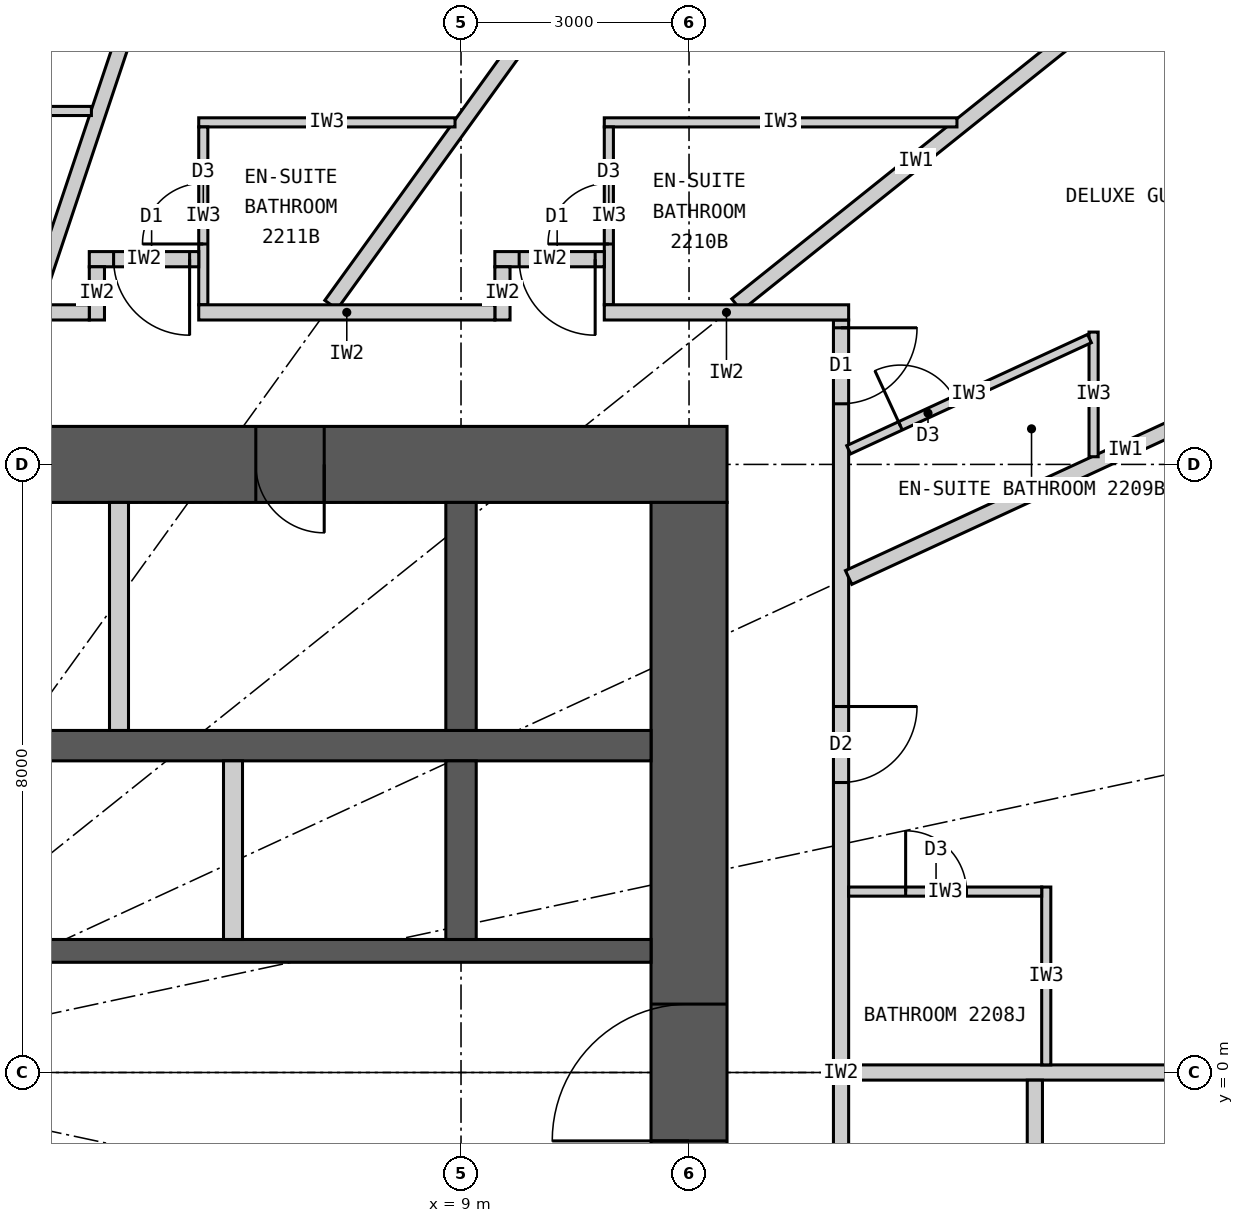
"""IFC4 building model, lengths in metres.
Left out: names, types, materials, properties, quantities, classifications, styles, units other than length and angle.
Written with IfcOpenShell. Run it as: python <this file> out.ifc"""

import sys

from ifc_helpers import new_model, si_unit, direction, frame, frame_2d, origin, place, context, subcontext, project, spatial, rectangle, extrude, element, fill, save


model = new_model("IFC4")
c1 = context("Model", 3, precision=1e-05, world=origin(), true_north=direction((0.0, 1.0)))
c2 = subcontext(c1, "Body", "Model", "MODEL_VIEW")
j1 = project(units=[si_unit("LENGTHUNIT", "METRE"), si_unit("PLANEANGLEUNIT", "RADIAN")], contexts=[c1])
p1 = place(None, origin())
s1 = spatial("IfcSite", under=j1, at=p1, CompositionType="ELEMENT")
p2 = place(p1, origin())
s2 = spatial("IfcBuilding", under=s1, at=p2, CompositionType="ELEMENT")
p3 = place(p2, frame((0.0, 0.0, 87.0)))
s3 = spatial("IfcBuildingStorey", under=s2, at=p3, CompositionType="ELEMENT", Elevation=87.0)
p4 = place(p3, frame((-12.5, 8.0, 0.0), z_axis=(0.0, 0.0, 1.0), x_axis=(1.0, 0.0, 0.0)))
e1 = element("IfcWall", 1, at=p4, inside=s3, PredefinedType="SHEAR", context=c2, shape_type="SweptSolid", body=[
    extrude(rectangle(XDim=25.0, YDim=1.0, at=frame_2d((12.5, 0.0))), origin(), (0.0, 0.0, 1.0), 3.3),
])
p5 = place(p4, frame((11.2, 0.0, 0.0)))
e2 = element("IfcOpeningElement", 2, at=p5, cuts=e1, PredefinedType="OPENING", context=c2, shape_type="SweptSolid", body=[
    extrude(rectangle(XDim=1.2, YDim=2.2, at=frame_2d((0.6, 1.1))), frame((0.0, 0.51, 0.0), z_axis=(0.0, -1.0, 0.0), x_axis=(1.0, 0.0, 0.0)), (0.0, 0.0, 1.0), 1.02),
])
p6 = place(p4, frame((18.8, 0.0, 0.0)))
e3 = element("IfcOpeningElement", 3, at=p6, cuts=e1, PredefinedType="OPENING", context=c2, shape_type="SweptSolid", body=[
    extrude(rectangle(XDim=0.9, YDim=2.2, at=frame_2d((0.45, 1.1))), frame((0.0, 0.51, 0.0), z_axis=(0.0, -1.0, 0.0), x_axis=(1.0, 0.0, 0.0)), (0.0, 0.0, 1.0), 1.02),
])
p7 = place(p3, frame((12.0, -7.5, 0.0), z_axis=(0.0, 0.0, 1.0), x_axis=(0.0, 1.0, 0.0)))
e4 = element("IfcWall", 4, at=p7, inside=s3, PredefinedType="SHEAR", context=c2, shape_type="SweptSolid", body=[
    extrude(rectangle(XDim=15.0, YDim=1.0, at=frame_2d((7.5, 0.0))), origin(), (0.0, 0.0, 1.0), 3.3),
])
p8 = place(p7, frame((6.6, 0.0, 0.0)))
e5 = element("IfcOpeningElement", 5, at=p8, cuts=e4, PredefinedType="OPENING", context=c2, shape_type="SweptSolid", body=[
    extrude(rectangle(XDim=1.8, YDim=2.2, at=frame_2d((0.9, 1.1))), frame((0.0, 0.51, 0.0), z_axis=(0.0, -1.0, 0.0), x_axis=(1.0, 0.0, 0.0)), (0.0, 0.0, 1.0), 1.02),
])
p9 = place(p3, frame((-11.5, 4.3, 0.0), z_axis=(0.0, 0.0, 1.0), x_axis=(1.0, 0.0, 0.0)))
e6 = element("IfcWall", 6, at=p9, inside=s3, PredefinedType="SHEAR", context=c2, shape_type="SweptSolid", body=[
    extrude(rectangle(XDim=23.0, YDim=0.4, at=frame_2d((11.5, 0.0))), origin(), (0.0, 0.0, 1.0), 3.3),
])
p10 = place(p3, frame((-11.5, 1.6, 0.0), z_axis=(0.0, 0.0, 1.0), x_axis=(1.0, 0.0, 0.0)))
e7 = element("IfcWall", 7, at=p10, inside=s3, PredefinedType="SHEAR", context=c2, shape_type="SweptSolid", body=[
    extrude(rectangle(XDim=23.0, YDim=0.3, at=frame_2d((11.5, 0.0))), origin(), (0.0, 0.0, 1.0), 3.3),
])
p11 = place(p10, frame((0.45, 0.0, 0.0)))
e8 = element("IfcOpeningElement", 8, at=p11, cuts=e7, PredefinedType="OPENING", context=c2, shape_type="SweptSolid", body=[
    extrude(rectangle(XDim=1.1, YDim=2.2, at=frame_2d((0.55, 1.1))), frame((0.0, 0.16, 0.0), z_axis=(0.0, -1.0, 0.0), x_axis=(1.0, 0.0, 0.0)), (0.0, 0.0, 1.0), 0.32),
])
p12 = place(p10, frame((3.45, 0.0, 0.0)))
e9 = element("IfcOpeningElement", 9, at=p12, cuts=e7, PredefinedType="OPENING", context=c2, shape_type="SweptSolid", body=[
    extrude(rectangle(XDim=1.1, YDim=2.2, at=frame_2d((0.55, 1.1))), frame((0.0, 0.16, 0.0), z_axis=(0.0, -1.0, 0.0), x_axis=(1.0, 0.0, 0.0)), (0.0, 0.0, 1.0), 0.32),
])
p13 = place(p10, frame((11.05, 0.0, 0.0)))
e10 = element("IfcOpeningElement", 10, at=p13, cuts=e7, PredefinedType="OPENING", context=c2, shape_type="SweptSolid", body=[
    extrude(rectangle(XDim=0.9, YDim=2.2, at=frame_2d((0.45, 1.1))), frame((0.0, 0.16, 0.0), z_axis=(0.0, -1.0, 0.0), x_axis=(1.0, 0.0, 0.0)), (0.0, 0.0, 1.0), 0.32),
])
p14 = place(p3, frame((9.0, 4.5, 0.0), z_axis=(0.0, 0.0, 1.0), x_axis=(0.0, 1.0, 0.0)))
e11 = element("IfcWall", 11, at=p14, inside=s3, PredefinedType="SHEAR", context=c2, shape_type="SweptSolid", body=[
    extrude(rectangle(XDim=3.0, YDim=0.4, at=frame_2d((1.5, 0.0))), origin(), (0.0, 0.0, 1.0), 3.3),
])
p15 = place(p3, frame((9.0, 1.75, 0.0), z_axis=(0.0, 0.0, 1.0), x_axis=(0.0, 1.0, 0.0)))
e12 = element("IfcWall", 12, at=p15, inside=s3, PredefinedType="SHEAR", context=c2, shape_type="SweptSolid", body=[
    extrude(rectangle(XDim=2.35, YDim=0.4, at=frame_2d((1.175, 0.0))), origin(), (0.0, 0.0, 1.0), 3.3),
])
p16 = place(p3, frame((4.5, 4.5, 0.0), z_axis=(0.0, 0.0, 1.0), x_axis=(0.0, 1.0, 0.0)))
e13 = element("IfcWall", 13, at=p16, inside=s3, PredefinedType="PARTITIONING", context=c2, shape_type="SweptSolid", body=[
    extrude(rectangle(XDim=3.0, YDim=0.25, at=frame_2d((1.5, 0.0))), origin(), (0.0, 0.0, 1.0), 3.3),
])
p17 = place(p3, frame((6.0, 1.75, 0.0), z_axis=(0.0, 0.0, 1.0), x_axis=(0.0, 1.0, 0.0)))
e14 = element("IfcWall", 14, at=p17, inside=s3, PredefinedType="PARTITIONING", context=c2, shape_type="SweptSolid", body=[
    extrude(rectangle(XDim=2.35, YDim=0.25, at=frame_2d((1.175, 0.0))), origin(), (0.0, 0.0, 1.0), 3.3),
])
p18 = place(p3, frame((14.0, -9.9, 0.0), z_axis=(0.0, 0.0, 1.0), x_axis=(0.0, 1.0, 0.0)))
e15 = element("IfcWall", 15, at=p18, inside=s3, PredefinedType="PARTITIONING", context=c2, shape_type="SweptSolid", body=[
    extrude(rectangle(XDim=19.8, YDim=0.2, at=frame_2d((9.9, 0.0))), origin(), (0.0, 0.0, 1.0), 3.12),
])
p19 = place(p18, frame((0.204, 0.0, 0.0)))
e16 = element("IfcOpeningElement", 16, at=p19, cuts=e15, PredefinedType="OPENING", context=c2, shape_type="SweptSolid", body=[
    extrude(rectangle(XDim=1.0, YDim=2.2, at=frame_2d((0.5, 1.1))), frame((0.0, 0.11, 0.0), z_axis=(0.0, -1.0, 0.0), x_axis=(1.0, 0.0, 0.0)), (0.0, 0.0, 1.0), 0.22),
])
p20 = place(p18, frame((13.715, 0.0, 0.0)))
e17 = element("IfcOpeningElement", 17, at=p20, cuts=e15, PredefinedType="OPENING", context=c2, shape_type="SweptSolid", body=[
    extrude(rectangle(XDim=1.0, YDim=2.2, at=frame_2d((0.5, 1.1))), frame((0.0, 0.11, 0.0), z_axis=(0.0, -1.0, 0.0), x_axis=(1.0, 0.0, 0.0)), (0.0, 0.0, 1.0), 0.22),
])
p21 = place(p18, frame((18.698, 0.0, 0.0)))
e18 = element("IfcOpeningElement", 18, at=p21, cuts=e15, PredefinedType="OPENING", context=c2, shape_type="SweptSolid", body=[
    extrude(rectangle(XDim=1.0, YDim=2.2, at=frame_2d((0.5, 1.1))), frame((0.0, 0.11, 0.0), z_axis=(0.0, -1.0, 0.0), x_axis=(1.0, 0.0, 0.0)), (0.0, 0.0, 1.0), 0.22),
])
p22 = place(p3, frame((14.1, 0.0, 0.0), z_axis=(0.0, 0.0, 1.0), x_axis=(1.0, 0.0, 0.0)))
e19 = element("IfcWall", 19, at=p22, inside=s3, PredefinedType="PARTITIONING", context=c2, shape_type="SweptSolid", body=[
    extrude(rectangle(XDim=10.75, YDim=0.2, at=frame_2d((5.375, 0.0))), origin(), (0.0, 0.0, 1.0), 2.22),
])
p23 = place(p3, frame((14.1, 6.512, 0.0), z_axis=(0.0, 0.0, 1.0), x_axis=(0.907832871056, 0.419332181247, 0.0)))
e20 = element("IfcWall", 20, at=p23, inside=s3, PredefinedType="PARTITIONING", context=c2, shape_type="SweptSolid", body=[
    extrude(rectangle(XDim=8.023, YDim=0.2, at=frame_2d((4.011, 0.0))), origin(), (0.0, 0.0, 1.0), 2.22),
])
p24 = place(p3, frame((12.625, 10.1, 0.0), z_axis=(0.0, 0.0, 1.0), x_axis=(0.780892451574, 0.624665493744, 0.0)))
e21 = element("IfcWall", 21, at=p24, inside=s3, PredefinedType="PARTITIONING", context=c2, shape_type="SweptSolid", body=[
    extrude(rectangle(XDim=6.045, YDim=0.2, at=frame_2d((3.022, 0.0))), origin(), (0.0, 0.0, 1.0), 2.27),
])
p25 = place(p3, frame((7.289, 10.1, 0.0), z_axis=(0.0, 0.0, 1.0), x_axis=(0.585198353053, 0.810890182197, 0.0)))
e22 = element("IfcWall", 22, at=p25, inside=s3, PredefinedType="PARTITIONING", context=c2, shape_type="SweptSolid", body=[
    extrude(rectangle(XDim=8.36, YDim=0.2, at=frame_2d((4.18, 0.0))), origin(), (0.0, 0.0, 1.0), 2.27),
])
p26 = place(p3, frame((3.383, 10.1, 0.0), z_axis=(0.0, 0.0, 1.0), x_axis=(0.31759592231, 0.948226149256, 0.0)))
e23 = element("IfcWall", 23, at=p26, inside=s3, PredefinedType="PARTITIONING", context=c2, shape_type="SweptSolid", body=[
    extrude(rectangle(XDim=9.098, YDim=0.2, at=frame_2d((4.549, 0.0))), origin(), (0.0, 0.0, 1.0), 2.27),
])
p27 = place(p3, frame((16.55, -9.609, 0.0), z_axis=(0.0, 0.0, 1.0), x_axis=(0.0, 1.0, 0.0)))
e24 = element("IfcWall", 24, at=p27, inside=s3, PredefinedType="PARTITIONING", context=c2, shape_type="SweptSolid", body=[
    extrude(rectangle(XDim=9.508, YDim=0.2, at=frame_2d((4.754, 0.0))), origin(), (0.0, 0.0, 1.0), 3.12),
])
p28 = place(p27, frame((6.234, 0.0, 0.0)))
e25 = element("IfcOpeningElement", 25, at=p28, cuts=e24, PredefinedType="OPENING", context=c2, shape_type="SweptSolid", body=[
    extrude(rectangle(XDim=0.8, YDim=2.1, at=frame_2d((0.4, 1.05))), frame((0.0, 0.11, 0.0), z_axis=(0.0, -1.0, 0.0), x_axis=(1.0, 0.0, 0.0)), (0.0, 0.0, 1.0), 0.22),
])
p29 = place(p3, frame((16.7, 0.1, 0.0), z_axis=(0.0, 0.0, 1.0), x_axis=(0.0, 1.0, 0.0)))
e26 = element("IfcWall", 26, at=p29, inside=s3, PredefinedType="PARTITIONING", context=c2, shape_type="SweptSolid", body=[
    extrude(rectangle(XDim=2.34, YDim=0.12, at=frame_2d((1.17, 0.0))), origin(), (0.0, 0.0, 1.0), 3.12),
])
p30 = place(p3, frame((14.1, 2.38, 0.0), z_axis=(0.0, 0.0, 1.0), x_axis=(1.0, 0.0, 0.0)))
e27 = element("IfcWall", 27, at=p30, inside=s3, PredefinedType="PARTITIONING", context=c2, shape_type="SweptSolid", body=[
    extrude(rectangle(XDim=2.54, YDim=0.12, at=frame_2d((1.27, 0.0))), origin(), (0.0, 0.0, 1.0), 3.12),
])
p31 = place(p30, frame((0.75, 0.0, 0.0)))
e28 = element("IfcOpeningElement", 28, at=p31, cuts=e27, PredefinedType="OPENING", context=c2, shape_type="SweptSolid", body=[
    extrude(rectangle(XDim=0.8, YDim=2.1, at=frame_2d((0.4, 1.05))), frame((0.0, 0.07, 0.0), z_axis=(0.0, -1.0, 0.0), x_axis=(1.0, 0.0, 0.0)), (0.0, 0.0, 1.0), 0.14),
])
p32 = place(p3, frame((17.323, 8.101, 0.0), z_axis=(0.0, 0.0, 1.0), x_axis=(0.0, 1.0, 0.0)))
e29 = element("IfcWall", 29, at=p32, inside=s3, PredefinedType="PARTITIONING", context=c2, shape_type="SweptSolid", body=[
    extrude(rectangle(XDim=1.64, YDim=0.12, at=frame_2d((0.82, 0.0))), origin(), (0.0, 0.0, 1.0), 3.12),
])
p33 = place(p3, frame((14.1, 8.193, 0.0), z_axis=(0.0, 0.0, 1.0), x_axis=(0.907836493557, 0.419324338628, 0.0)))
e30 = element("IfcWall", 30, at=p33, inside=s3, PredefinedType="PARTITIONING", context=c2, shape_type="SweptSolid", body=[
    extrude(rectangle(XDim=3.49, YDim=0.12, at=frame_2d((1.745, 0.0))), origin(), (0.0, 0.0, 1.0), 3.12),
])
p34 = place(p33, frame((0.75, 0.0, 0.0)))
e31 = element("IfcOpeningElement", 31, at=p34, cuts=e30, PredefinedType="OPENING", context=c2, shape_type="SweptSolid", body=[
    extrude(rectangle(XDim=0.8, YDim=2.1, at=frame_2d((0.4, 1.05))), frame((0.0, 0.07, 0.0), z_axis=(0.0, -1.0, 0.0), x_axis=(1.0, 0.0, 0.0)), (0.0, 0.0, 1.0), 0.14),
])
p35 = place(p3, frame((15.525, 12.5, 0.0), z_axis=(0.0, 0.0, 1.0), x_axis=(-1.0, 0.0, 0.0)))
e32 = element("IfcWall", 32, at=p35, inside=s3, PredefinedType="PARTITIONING", context=c2, shape_type="SweptSolid", body=[
    extrude(rectangle(XDim=4.64, YDim=0.12, at=frame_2d((2.32, 0.0))), origin(), (0.0, 0.0, 1.0), 3.12),
])
p36 = place(p3, frame((10.945, 10.1, 0.0), z_axis=(0.0, 0.0, 1.0), x_axis=(0.0, 1.0, 0.0)))
e33 = element("IfcWall", 33, at=p36, inside=s3, PredefinedType="PARTITIONING", context=c2, shape_type="SweptSolid", body=[
    extrude(rectangle(XDim=2.34, YDim=0.12, at=frame_2d((1.17, 0.0))), origin(), (0.0, 0.0, 1.0), 3.12),
])
p37 = place(p36, frame((0.8, 0.0, 0.0)))
e34 = element("IfcOpeningElement", 34, at=p37, cuts=e33, PredefinedType="OPENING", context=c2, shape_type="SweptSolid", body=[
    extrude(rectangle(XDim=0.8, YDim=2.1, at=frame_2d((0.4, 1.05))), frame((0.0, 0.07, 0.0), z_axis=(0.0, -1.0, 0.0), x_axis=(1.0, 0.0, 0.0)), (0.0, 0.0, 1.0), 0.14),
])
p38 = place(p3, frame((8.921, 12.5, 0.0), z_axis=(0.0, 0.0, 1.0), x_axis=(-1.0, 0.0, 0.0)))
e35 = element("IfcWall", 35, at=p38, inside=s3, PredefinedType="PARTITIONING", context=c2, shape_type="SweptSolid", body=[
    extrude(rectangle(XDim=3.372, YDim=0.12, at=frame_2d((1.686, 0.0))), origin(), (0.0, 0.0, 1.0), 3.12),
])
p39 = place(p3, frame((5.609, 10.1, 0.0), z_axis=(0.0, 0.0, 1.0), x_axis=(0.0, 1.0, 0.0)))
e36 = element("IfcWall", 36, at=p39, inside=s3, PredefinedType="PARTITIONING", context=c2, shape_type="SweptSolid", body=[
    extrude(rectangle(XDim=2.34, YDim=0.12, at=frame_2d((1.17, 0.0))), origin(), (0.0, 0.0, 1.0), 3.12),
])
p40 = place(p39, frame((0.8, 0.0, 0.0)))
e37 = element("IfcOpeningElement", 37, at=p40, cuts=e36, PredefinedType="OPENING", context=c2, shape_type="SweptSolid", body=[
    extrude(rectangle(XDim=0.8, YDim=2.1, at=frame_2d((0.4, 1.05))), frame((0.0, 0.07, 0.0), z_axis=(0.0, -1.0, 0.0), x_axis=(1.0, 0.0, 0.0)), (0.0, 0.0, 1.0), 0.14),
])
p41 = place(p3, frame((4.137, 12.65, 0.0), z_axis=(0.0, 0.0, 1.0), x_axis=(-1.0, 0.0, 0.0)))
e38 = element("IfcWall", 38, at=p41, inside=s3, PredefinedType="PARTITIONING", context=c2, shape_type="SweptSolid", body=[
    extrude(rectangle(XDim=2.494, YDim=0.12, at=frame_2d((1.247, 0.0))), origin(), (0.0, 0.0, 1.0), 3.12),
])
p42 = place(p3, frame((9.445, 10.7, 0.0), z_axis=(0.0, 0.0, 1.0), x_axis=(1.0, 0.0, 0.0)))
e39 = element("IfcWall", 39, at=p42, inside=s3, PredefinedType="PARTITIONING", context=c2, shape_type="SweptSolid", body=[
    extrude(rectangle(XDim=1.44, YDim=0.2, at=frame_2d((0.72, 0.0))), origin(), (0.0, 0.0, 1.0), 3.12),
])
p43 = place(p42, frame((0.32, 0.0, 0.0)))
e40 = element("IfcOpeningElement", 40, at=p43, cuts=e39, PredefinedType="OPENING", context=c2, shape_type="SweptSolid", body=[
    extrude(rectangle(XDim=1.0, YDim=2.2, at=frame_2d((0.5, 1.1))), frame((0.0, 0.11, 0.0), z_axis=(0.0, -1.0, 0.0), x_axis=(1.0, 0.0, 0.0)), (0.0, 0.0, 1.0), 0.22),
])
p44 = place(p3, frame((9.545, 9.9, 0.0), z_axis=(0.0, 0.0, 1.0), x_axis=(0.0, 1.0, 0.0)))
e41 = element("IfcWall", 41, at=p44, inside=s3, PredefinedType="PARTITIONING", context=c2, shape_type="SweptSolid", body=[
    extrude(rectangle(XDim=0.7, YDim=0.2, at=frame_2d((0.35, 0.0))), origin(), (0.0, 0.0, 1.0), 3.12),
])
p45 = place(p3, frame((4.109, 10.7, 0.0), z_axis=(0.0, 0.0, 1.0), x_axis=(1.0, 0.0, 0.0)))
e42 = element("IfcWall", 42, at=p45, inside=s3, PredefinedType="PARTITIONING", context=c2, shape_type="SweptSolid", body=[
    extrude(rectangle(XDim=1.44, YDim=0.2, at=frame_2d((0.72, 0.0))), origin(), (0.0, 0.0, 1.0), 3.12),
])
p46 = place(p45, frame((0.32, 0.0, 0.0)))
e43 = element("IfcOpeningElement", 43, at=p46, cuts=e42, PredefinedType="OPENING", context=c2, shape_type="SweptSolid", body=[
    extrude(rectangle(XDim=1.0, YDim=2.2, at=frame_2d((0.5, 1.1))), frame((0.0, 0.11, 0.0), z_axis=(0.0, -1.0, 0.0), x_axis=(1.0, 0.0, 0.0)), (0.0, 0.0, 1.0), 0.22),
])
p47 = place(p3, frame((4.209, 9.9, 0.0), z_axis=(0.0, 0.0, 1.0), x_axis=(0.0, 1.0, 0.0)))
e44 = element("IfcWall", 44, at=p47, inside=s3, PredefinedType="PARTITIONING", context=c2, shape_type="SweptSolid", body=[
    extrude(rectangle(XDim=0.7, YDim=0.2, at=frame_2d((0.35, 0.0))), origin(), (0.0, 0.0, 1.0), 3.12),
])
p48 = place(p3, frame((1.643, 10.0, 0.0), z_axis=(0.0, 0.0, 1.0), x_axis=(1.0, 0.0, 0.0)))
e45 = element("IfcWall", 45, at=p48, inside=s3, PredefinedType="PARTITIONING", context=c2, shape_type="SweptSolid", body=[
    extrude(rectangle(XDim=2.466, YDim=0.2, at=frame_2d((1.233, 0.0))), origin(), (0.0, 0.0, 1.0), 3.12),
])
p49 = place(p3, frame((5.549, 10.0, 0.0), z_axis=(0.0, 0.0, 1.0), x_axis=(1.0, 0.0, 0.0)))
e46 = element("IfcWall", 46, at=p49, inside=s3, PredefinedType="PARTITIONING", context=c2, shape_type="SweptSolid", body=[
    extrude(rectangle(XDim=3.896, YDim=0.2, at=frame_2d((1.948, 0.0))), origin(), (0.0, 0.0, 1.0), 3.12),
])
p50 = place(p3, frame((10.885, 10.0, 0.0), z_axis=(0.0, 0.0, 1.0), x_axis=(1.0, 0.0, 0.0)))
e47 = element("IfcWall", 47, at=p50, inside=s3, PredefinedType="PARTITIONING", context=c2, shape_type="SweptSolid", body=[
    extrude(rectangle(XDim=3.215, YDim=0.2, at=frame_2d((1.607, 0.0))), origin(), (0.0, 0.0, 1.0), 3.12),
])
p51 = place(p31, origin())
e48 = element("IfcDoor", 48, at=p51, inside=s3, OperationType="SINGLE_SWING_LEFT", PredefinedType="DOOR", context=c2, shape_type="SweptSolid", body=[
    extrude(rectangle(XDim=0.8, YDim=2.1, at=frame_2d((0.4, 1.05))), frame((0.0, 0.025, 0.0), z_axis=(0.0, -1.0, 0.0), x_axis=(1.0, 0.0, 0.0)), (0.0, 0.0, 1.0), 0.05),
])
fill(e28, e48)
p52 = place(p20, origin())
e49 = element("IfcDoor", 49, at=p52, inside=s3, OperationType="SINGLE_SWING_RIGHT", PredefinedType="DOOR", context=c2, shape_type="SweptSolid", body=[
    extrude(rectangle(XDim=1.0, YDim=2.2, at=frame_2d((0.5, 1.1))), frame((0.0, 0.025, 0.0), z_axis=(0.0, -1.0, 0.0), x_axis=(1.0, 0.0, 0.0)), (0.0, 0.0, 1.0), 0.05),
])
fill(e17, e49)
p53 = place(p34, origin())
e50 = element("IfcDoor", 50, at=p53, inside=s3, OperationType="SINGLE_SWING_LEFT", PredefinedType="DOOR", context=c2, shape_type="SweptSolid", body=[
    extrude(rectangle(XDim=0.8, YDim=2.1, at=frame_2d((0.4, 1.05))), frame((0.0, 0.025, 0.0), z_axis=(0.0, -1.0, 0.0), x_axis=(1.0, 0.0, 0.0)), (0.0, 0.0, 1.0), 0.05),
])
fill(e31, e50)
p54 = place(p21, origin())
e51 = element("IfcDoor", 51, at=p54, inside=s3, OperationType="SINGLE_SWING_RIGHT", PredefinedType="DOOR", context=c2, shape_type="SweptSolid", body=[
    extrude(rectangle(XDim=1.0, YDim=2.2, at=frame_2d((0.5, 1.1))), frame((0.0, 0.025, 0.0), z_axis=(0.0, -1.0, 0.0), x_axis=(1.0, 0.0, 0.0)), (0.0, 0.0, 1.0), 0.05),
])
fill(e18, e51)
p55 = place(p37, origin())
e52 = element("IfcDoor", 52, at=p55, inside=s3, OperationType="SINGLE_SWING_LEFT", PredefinedType="DOOR", context=c2, shape_type="SweptSolid", body=[
    extrude(rectangle(XDim=0.8, YDim=2.1, at=frame_2d((0.4, 1.05))), frame((0.0, 0.025, 0.0), z_axis=(0.0, -1.0, 0.0), x_axis=(1.0, 0.0, 0.0)), (0.0, 0.0, 1.0), 0.05),
])
fill(e34, e52)
p56 = place(p43, origin())
e53 = element("IfcDoor", 53, at=p56, inside=s3, OperationType="SINGLE_SWING_RIGHT", PredefinedType="DOOR", context=c2, shape_type="SweptSolid", body=[
    extrude(rectangle(XDim=1.0, YDim=2.2, at=frame_2d((0.5, 1.1))), frame((0.0, 0.025, 0.0), z_axis=(0.0, -1.0, 0.0), x_axis=(1.0, 0.0, 0.0)), (0.0, 0.0, 1.0), 0.05),
])
fill(e40, e53)
p57 = place(p40, origin())
e54 = element("IfcDoor", 54, at=p57, inside=s3, OperationType="SINGLE_SWING_LEFT", PredefinedType="DOOR", context=c2, shape_type="SweptSolid", body=[
    extrude(rectangle(XDim=0.8, YDim=2.1, at=frame_2d((0.4, 1.05))), frame((0.0, 0.025, 0.0), z_axis=(0.0, -1.0, 0.0), x_axis=(1.0, 0.0, 0.0)), (0.0, 0.0, 1.0), 0.05),
])
fill(e37, e54)
p58 = place(p46, origin())
e55 = element("IfcDoor", 55, at=p58, inside=s3, OperationType="SINGLE_SWING_RIGHT", PredefinedType="DOOR", context=c2, shape_type="SweptSolid", body=[
    extrude(rectangle(XDim=1.0, YDim=2.2, at=frame_2d((0.5, 1.1))), frame((0.0, 0.025, 0.0), z_axis=(0.0, -1.0, 0.0), x_axis=(1.0, 0.0, 0.0)), (0.0, 0.0, 1.0), 0.05),
])
fill(e43, e55)
p59 = place(p6, origin())
e56 = element("IfcDoor", 56, at=p59, inside=s3, OperationType="SINGLE_SWING_RIGHT", PredefinedType="DOOR", context=c2, shape_type="SweptSolid", body=[
    extrude(rectangle(XDim=0.9, YDim=2.2, at=frame_2d((0.45, 1.1))), frame((0.0, 0.025, 0.0), z_axis=(0.0, -1.0, 0.0), x_axis=(1.0, 0.0, 0.0)), (0.0, 0.0, 1.0), 0.05),
])
fill(e3, e56)
p60 = place(p8, origin())
e57 = element("IfcDoor", 57, at=p60, inside=s3, OperationType="DOUBLE_DOOR_DOUBLE_SWING", PredefinedType="DOOR", context=c2, shape_type="SweptSolid", body=[
    extrude(rectangle(XDim=1.8, YDim=2.2, at=frame_2d((0.9, 1.1))), frame((0.0, 0.025, 0.0), z_axis=(0.0, -1.0, 0.0), x_axis=(1.0, 0.0, 0.0)), (0.0, 0.0, 1.0), 0.05),
])
fill(e5, e57)
save(model, sys.argv[1])
